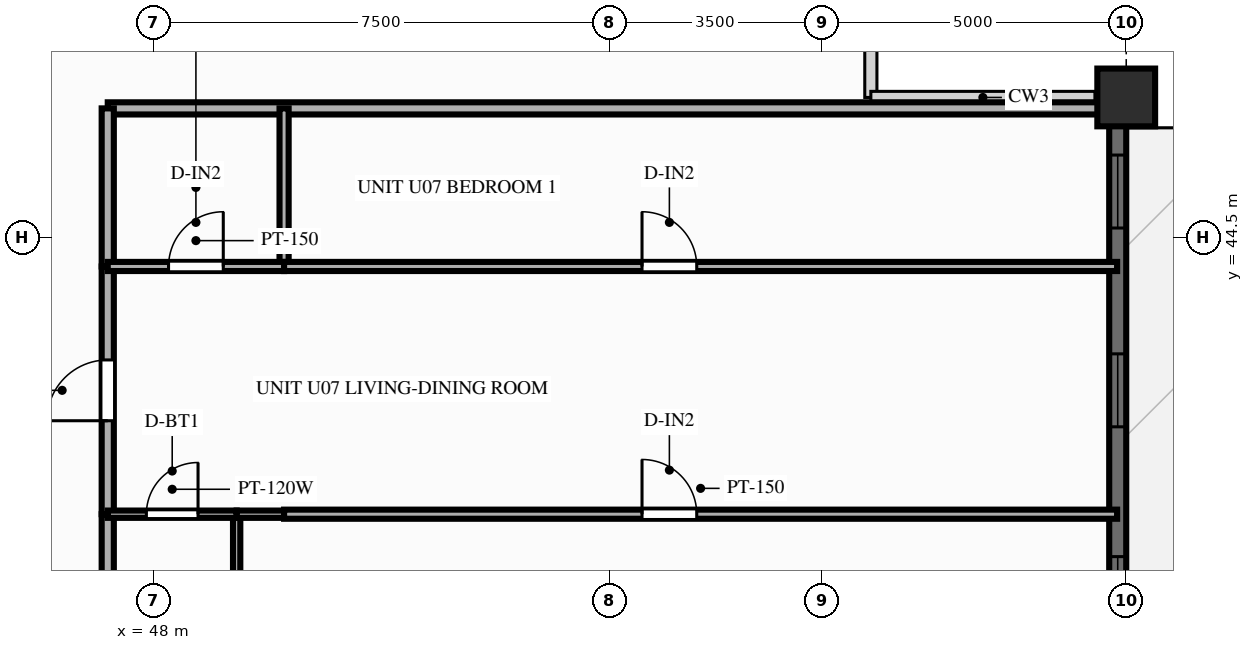
"""IFC4 building model, lengths in metres.
Left out: names, types, materials, properties, quantities, classifications, styles, units other than length and angle.
Written with IfcOpenShell. Run it as: python <this file> out.ifc"""

import sys

from ifc_helpers import new_model, si_unit, direction, frame, frame_2d, origin, origin_2d, place, context, subcontext, project, spatial, rectangle, extrude, source, transform, mapped, element, fill, save


model = new_model("IFC4")
c1 = context("Model", 3, precision=1e-05, world=origin(), true_north=direction((0.0, 1.0)))
c2 = subcontext(c1, "Body", "Model", "MODEL_VIEW")
j1 = project(units=[si_unit("LENGTHUNIT", "METRE"), si_unit("PLANEANGLEUNIT", "RADIAN")], contexts=[c1])
p1 = place(None, origin())
s1 = spatial("IfcSite", under=j1, at=p1, CompositionType="ELEMENT")
p2 = place(p1, origin())
s2 = spatial("IfcBuilding", under=s1, at=p2, CompositionType="ELEMENT")
p3 = place(p2, frame((0.0, 0.0, 98.85)))
s3 = spatial("IfcBuildingStorey", under=s2, at=p3, CompositionType="ELEMENT", Elevation=98.85)
m1 = source(origin(), c2, "Body", "SweptSolid", [
    extrude(rectangle(XDim=0.95, YDim=0.95, at=origin_2d()), origin(), (0.0, 0.0, 1.0), 3.0),
])
p4 = place(p3, frame((64.0, 46.8, 0.0), z_axis=(0.0, 0.0, 1.0), x_axis=(1.0, 0.0, 0.0)))
e1 = element("IfcColumn", 1, at=p4, inside=s3, PredefinedType="COLUMN", context=c2, shape_type="MappedRepresentation", body=[
    mapped(m1, transform((0.0, 0.0, 0.0), scale=1.0)),
])
p5 = place(p3, frame((63.86, 7.2, 0.0), z_axis=(0.0, 0.0, 1.0), x_axis=(0.0, 1.0, 0.0)))
e2 = element("IfcWall", 2, at=p5, inside=s3, PredefinedType="SOLIDWALL", context=c2, shape_type="SweptSolid", body=[
    extrude(rectangle(XDim=39.6, YDim=0.28, at=frame_2d((19.8, 0.0))), origin(), (0.0, 0.0, 1.0), 2.28),
])
p6 = place(p5, frame((0.945, 0.0, 0.25)))
e3 = element("IfcOpeningElement", 3, at=p6, cuts=e2, PredefinedType="OPENING", context=c2, shape_type="SweptSolid", body=[
    extrude(rectangle(XDim=1.2, YDim=1.5, at=frame_2d((0.6, 0.75))), frame((0.0, 0.152, 0.0), z_axis=(0.0, -1.0, 0.0), x_axis=(1.0, 0.0, 0.0)), (0.0, 0.0, 1.0), 0.304),
])
p7 = place(p5, frame((4.213, 0.0, 0.25)))
e4 = element("IfcOpeningElement", 4, at=p7, cuts=e2, PredefinedType="OPENING", context=c2, shape_type="SweptSolid", body=[
    extrude(rectangle(XDim=1.2, YDim=1.5, at=frame_2d((0.6, 0.75))), frame((0.0, 0.152, 0.0), z_axis=(0.0, -1.0, 0.0), x_axis=(1.0, 0.0, 0.0)), (0.0, 0.0, 1.0), 0.304),
])
p8 = place(p5, frame((7.55, 0.0, 0.25)))
e5 = element("IfcOpeningElement", 5, at=p8, cuts=e2, PredefinedType="OPENING", context=c2, shape_type="SweptSolid", body=[
    extrude(rectangle(XDim=1.2, YDim=1.5, at=frame_2d((0.6, 0.75))), frame((0.0, 0.152, 0.0), z_axis=(0.0, -1.0, 0.0), x_axis=(1.0, 0.0, 0.0)), (0.0, 0.0, 1.0), 0.304),
])
p9 = place(p5, frame((13.483, 0.0, 0.25)))
e6 = element("IfcOpeningElement", 6, at=p9, cuts=e2, PredefinedType="OPENING", context=c2, shape_type="SweptSolid", body=[
    extrude(rectangle(XDim=1.2, YDim=1.5, at=frame_2d((0.6, 0.75))), frame((0.0, 0.152, 0.0), z_axis=(0.0, -1.0, 0.0), x_axis=(1.0, 0.0, 0.0)), (0.0, 0.0, 1.0), 0.304),
])
p10 = place(p5, frame((16.82, 0.0, 0.25)))
e7 = element("IfcOpeningElement", 7, at=p10, cuts=e2, PredefinedType="OPENING", context=c2, shape_type="SweptSolid", body=[
    extrude(rectangle(XDim=1.2, YDim=1.5, at=frame_2d((0.6, 0.75))), frame((0.0, 0.152, 0.0), z_axis=(0.0, -1.0, 0.0), x_axis=(1.0, 0.0, 0.0)), (0.0, 0.0, 1.0), 0.304),
])
p11 = place(p5, frame((19.2, 0.0, 0.25)))
e8 = element("IfcOpeningElement", 8, at=p11, cuts=e2, PredefinedType="OPENING", context=c2, shape_type="SweptSolid", body=[
    extrude(rectangle(XDim=1.2, YDim=1.5, at=frame_2d((0.6, 0.75))), frame((0.0, 0.152, 0.0), z_axis=(0.0, -1.0, 0.0), x_axis=(1.0, 0.0, 0.0)), (0.0, 0.0, 1.0), 0.304),
])
p12 = place(p5, frame((21.578, 0.0, 0.25)))
e9 = element("IfcOpeningElement", 9, at=p12, cuts=e2, PredefinedType="OPENING", context=c2, shape_type="SweptSolid", body=[
    extrude(rectangle(XDim=1.2, YDim=1.5, at=frame_2d((0.6, 0.75))), frame((0.0, 0.152, 0.0), z_axis=(0.0, -1.0, 0.0), x_axis=(1.0, 0.0, 0.0)), (0.0, 0.0, 1.0), 0.304),
])
p13 = place(p5, frame((26.313, 0.0, 0.0), z_axis=(0.0, 0.0, 1.0), x_axis=(-1.0, 0.0, 0.0)))
e10 = element("IfcOpeningElement", 10, at=p13, cuts=e2, PredefinedType="OPENING", context=c2, shape_type="SweptSolid", body=[
    extrude(rectangle(XDim=1.6, YDim=2.15, at=frame_2d((0.8, 1.075))), frame((0.0, 0.152, 0.0), z_axis=(0.0, -1.0, 0.0), x_axis=(1.0, 0.0, 0.0)), (0.0, 0.0, 1.0), 0.304),
])
p14 = place(p5, frame((29.305, 0.0, 0.25)))
e11 = element("IfcOpeningElement", 11, at=p14, cuts=e2, PredefinedType="OPENING", context=c2, shape_type="SweptSolid", body=[
    extrude(rectangle(XDim=0.7, YDim=1.5, at=frame_2d((0.35, 0.75))), frame((0.0, 0.152, 0.0), z_axis=(0.0, -1.0, 0.0), x_axis=(1.0, 0.0, 0.0)), (0.0, 0.0, 1.0), 0.304),
])
p15 = place(p5, frame((30.848, 0.0, 0.25)))
e12 = element("IfcOpeningElement", 12, at=p15, cuts=e2, PredefinedType="OPENING", context=c2, shape_type="SweptSolid", body=[
    extrude(rectangle(XDim=1.2, YDim=1.5, at=frame_2d((0.6, 0.75))), frame((0.0, 0.152, 0.0), z_axis=(0.0, -1.0, 0.0), x_axis=(1.0, 0.0, 0.0)), (0.0, 0.0, 1.0), 0.304),
])
p16 = place(p5, frame((34.183, 0.0, 0.25)))
e13 = element("IfcOpeningElement", 13, at=p16, cuts=e2, PredefinedType="OPENING", context=c2, shape_type="SweptSolid", body=[
    extrude(rectangle(XDim=1.2, YDim=1.5, at=frame_2d((0.6, 0.75))), frame((0.0, 0.152, 0.0), z_axis=(0.0, -1.0, 0.0), x_axis=(1.0, 0.0, 0.0)), (0.0, 0.0, 1.0), 0.304),
])
p17 = place(p5, frame((37.452, 0.0, 0.25)))
e14 = element("IfcOpeningElement", 14, at=p17, cuts=e2, PredefinedType="OPENING", context=c2, shape_type="SweptSolid", body=[
    extrude(rectangle(XDim=1.2, YDim=1.5, at=frame_2d((0.6, 0.75))), frame((0.0, 0.152, 0.0), z_axis=(0.0, -1.0, 0.0), x_axis=(1.0, 0.0, 0.0)), (0.0, 0.0, 1.0), 0.304),
])
p18 = place(p3, frame((47.25, 46.62, 0.0), z_axis=(0.0, 0.0, 1.0), x_axis=(1.0, 0.0, 0.0)))
e15 = element("IfcWall", 15, at=p18, inside=s3, PredefinedType="PARTITIONING", context=c2, shape_type="SweptSolid", body=[
    extrude(rectangle(XDim=16.6, YDim=0.2, at=frame_2d((8.3, 0.0))), origin(), (0.0, 0.0, 1.0), 2.79),
])
p19 = place(p3, frame((47.25, 37.35, 0.0), z_axis=(0.0, 0.0, 1.0), x_axis=(0.0, 1.0, 0.0)))
e16 = element("IfcWall", 16, at=p19, inside=s3, PredefinedType="PARTITIONING", context=c2, shape_type="SweptSolid", body=[
    extrude(rectangle(XDim=2.595, YDim=0.2, at=frame_2d((1.298, 0.0))), origin(), (0.0, 0.0, 1.0), 2.79),
])
p20 = place(p3, frame((47.25, 39.946, 0.0), z_axis=(0.0, 0.0, 1.0), x_axis=(0.0, 1.0, 0.0)))
e17 = element("IfcWall", 17, at=p20, inside=s3, PredefinedType="PARTITIONING", context=c2, shape_type="SweptSolid", body=[
    extrude(rectangle(XDim=4.074, YDim=0.2, at=frame_2d((2.037, 0.0))), origin(), (0.0, 0.0, 1.0), 2.79),
])
p21 = place(p20, frame((1.537, 0.0, 0.0)))
e18 = element("IfcOpeningElement", 18, at=p21, cuts=e17, PredefinedType="OPENING", context=c2, shape_type="SweptSolid", body=[
    extrude(rectangle(XDim=1.0, YDim=2.15, at=frame_2d((0.5, 1.075))), frame((0.0, 0.112, 0.0), z_axis=(0.0, -1.0, 0.0), x_axis=(1.0, 0.0, 0.0)), (0.0, 0.0, 1.0), 0.224),
])
p22 = place(p3, frame((47.25, 44.02, 0.0), z_axis=(0.0, 0.0, 1.0), x_axis=(0.0, 1.0, 0.0)))
e19 = element("IfcWall", 19, at=p22, inside=s3, PredefinedType="PARTITIONING", context=c2, shape_type="SweptSolid", body=[
    extrude(rectangle(XDim=2.6, YDim=0.2, at=frame_2d((1.3, 0.0))), origin(), (0.0, 0.0, 1.0), 2.79),
])
p23 = place(p3, frame((49.37, 37.35, 0.0), z_axis=(0.0, 0.0, 1.0), x_axis=(0.0, 1.0, 0.0)))
e20 = element("IfcWall", 20, at=p23, inside=s3, PredefinedType="PARTITIONING", context=c2, shape_type="SweptSolid", body=[
    extrude(rectangle(XDim=2.595, YDim=0.12, at=frame_2d((1.298, 0.0))), origin(), (0.0, 0.0, 1.0), 2.79),
])
p24 = place(p3, frame((50.15, 44.02, 0.0), z_axis=(0.0, 0.0, 1.0), x_axis=(0.0, 1.0, 0.0)))
e21 = element("IfcWall", 21, at=p24, inside=s3, PredefinedType="PARTITIONING", context=c2, shape_type="SweptSolid", body=[
    extrude(rectangle(XDim=2.6, YDim=0.15, at=frame_2d((1.3, 0.0))), origin(), (0.0, 0.0, 1.0), 2.79),
])
p25 = place(p3, frame((47.25, 39.946, 0.0), z_axis=(0.0, 0.0, 1.0), x_axis=(1.0, 0.0, 0.0)))
e22 = element("IfcWall", 22, at=p25, inside=s3, PredefinedType="PARTITIONING", context=c2, shape_type="SweptSolid", body=[
    extrude(rectangle(XDim=2.12, YDim=0.12, at=frame_2d((1.06, 0.0))), origin(), (0.0, 0.0, 1.0), 2.79),
])
p26 = place(p25, frame((0.635, 0.0, 0.0)))
e23 = element("IfcOpeningElement", 23, at=p26, cuts=e22, PredefinedType="OPENING", context=c2, shape_type="SweptSolid", body=[
    extrude(rectangle(XDim=0.85, YDim=2.05, at=frame_2d((0.425, 1.025))), frame((0.0, 0.072, 0.0), z_axis=(0.0, -1.0, 0.0), x_axis=(1.0, 0.0, 0.0)), (0.0, 0.0, 1.0), 0.144),
])
p27 = place(p3, frame((49.37, 39.946, 0.0), z_axis=(0.0, 0.0, 1.0), x_axis=(1.0, 0.0, 0.0)))
e24 = element("IfcWall", 24, at=p27, inside=s3, PredefinedType="PARTITIONING", context=c2, shape_type="SweptSolid", body=[
    extrude(rectangle(XDim=0.78, YDim=0.12, at=frame_2d((0.39, 0.0))), origin(), (0.0, 0.0, 1.0), 2.79),
])
p28 = place(p3, frame((50.15, 39.946, 0.0), z_axis=(0.0, 0.0, 1.0), x_axis=(1.0, 0.0, 0.0)))
e25 = element("IfcWall", 25, at=p28, inside=s3, PredefinedType="PARTITIONING", context=c2, shape_type="SweptSolid", body=[
    extrude(rectangle(XDim=13.7, YDim=0.15, at=frame_2d((6.85, 0.0))), origin(), (0.0, 0.0, 1.0), 2.79),
])
p29 = place(p28, frame((5.887, 0.0, 0.0)))
e26 = element("IfcOpeningElement", 26, at=p29, cuts=e25, PredefinedType="OPENING", context=c2, shape_type="SweptSolid", body=[
    extrude(rectangle(XDim=0.9, YDim=2.1, at=frame_2d((0.45, 1.05))), frame((0.0, 0.087, 0.0), z_axis=(0.0, -1.0, 0.0), x_axis=(1.0, 0.0, 0.0)), (0.0, 0.0, 1.0), 0.174),
])
p30 = place(p3, frame((47.25, 44.02, 0.0), z_axis=(0.0, 0.0, 1.0), x_axis=(1.0, 0.0, 0.0)))
e27 = element("IfcWall", 27, at=p30, inside=s3, PredefinedType="PARTITIONING", context=c2, shape_type="SweptSolid", body=[
    extrude(rectangle(XDim=2.9, YDim=0.15, at=frame_2d((1.45, 0.0))), origin(), (0.0, 0.0, 1.0), 2.79),
])
p31 = place(p30, frame((1.0, 0.0, 0.0)))
e28 = element("IfcOpeningElement", 28, at=p31, cuts=e27, PredefinedType="OPENING", context=c2, shape_type="SweptSolid", body=[
    extrude(rectangle(XDim=0.9, YDim=2.1, at=frame_2d((0.45, 1.05))), frame((0.0, 0.087, 0.0), z_axis=(0.0, -1.0, 0.0), x_axis=(1.0, 0.0, 0.0)), (0.0, 0.0, 1.0), 0.174),
])
p32 = place(p3, frame((50.15, 44.02, 0.0), z_axis=(0.0, 0.0, 1.0), x_axis=(1.0, 0.0, 0.0)))
e29 = element("IfcWall", 29, at=p32, inside=s3, PredefinedType="PARTITIONING", context=c2, shape_type="SweptSolid", body=[
    extrude(rectangle(XDim=13.7, YDim=0.15, at=frame_2d((6.85, 0.0))), origin(), (0.0, 0.0, 1.0), 2.79),
])
p33 = place(p32, frame((5.887, 0.0, 0.0)))
e30 = element("IfcOpeningElement", 30, at=p33, cuts=e29, PredefinedType="OPENING", context=c2, shape_type="SweptSolid", body=[
    extrude(rectangle(XDim=0.9, YDim=2.1, at=frame_2d((0.45, 1.05))), frame((0.0, 0.087, 0.0), z_axis=(0.0, -1.0, 0.0), x_axis=(1.0, 0.0, 0.0)), (0.0, 0.0, 1.0), 0.174),
])
m2 = source(origin(), c2, "Body", "SweptSolid", [
    extrude(rectangle(XDim=1.2, YDim=1.5, at=frame_2d((0.6, 0.75))), frame((0.0, 0.03, 0.0), z_axis=(0.0, -1.0, 0.0), x_axis=(1.0, 0.0, 0.0)), (0.0, 0.0, 1.0), 0.06),
])
p34 = place(p15, origin())
e31 = element("IfcWindow", 31, at=p34, inside=s3, PartitioningType="SINGLE_PANEL", PredefinedType="WINDOW", context=c2, shape_type="MappedRepresentation", body=[
    mapped(m2, transform((0.0, 0.0, 0.0), scale=1.0)),
])
fill(e12, e31)
p35 = place(p16, origin())
e32 = element("IfcWindow", 32, at=p35, inside=s3, PartitioningType="SINGLE_PANEL", PredefinedType="WINDOW", context=c2, shape_type="MappedRepresentation", body=[
    mapped(m2, transform((0.0, 0.0, 0.0), scale=1.0)),
])
fill(e13, e32)
p36 = place(p17, origin())
e33 = element("IfcWindow", 33, at=p36, inside=s3, PartitioningType="SINGLE_PANEL", PredefinedType="WINDOW", context=c2, shape_type="MappedRepresentation", body=[
    mapped(m2, transform((0.0, 0.0, 0.0), scale=1.0)),
])
fill(e14, e33)
m3 = source(origin(), c2, "Body", "SweptSolid", [
    extrude(rectangle(XDim=1.0, YDim=2.15, at=frame_2d((0.5, 1.075))), frame((0.0, 0.025, 0.0), z_axis=(0.0, -1.0, 0.0), x_axis=(1.0, 0.0, 0.0)), (0.0, 0.0, 1.0), 0.05),
])
p37 = place(p21, origin())
e34 = element("IfcDoor", 34, at=p37, inside=s3, OperationType="SINGLE_SWING_LEFT", PredefinedType="DOOR", context=c2, shape_type="MappedRepresentation", body=[
    mapped(m3, transform((0.0, 0.0, 0.0), scale=1.0)),
])
fill(e18, e34)
m4 = source(origin(), c2, "Body", "SweptSolid", [
    extrude(rectangle(XDim=0.85, YDim=2.05, at=frame_2d((0.425, 1.025))), frame((0.0, 0.025, 0.0), z_axis=(0.0, -1.0, 0.0), x_axis=(1.0, 0.0, 0.0)), (0.0, 0.0, 1.0), 0.05),
])
p38 = place(p26, origin())
e35 = element("IfcDoor", 35, at=p38, inside=s3, OperationType="SINGLE_SWING_RIGHT", PredefinedType="DOOR", context=c2, shape_type="MappedRepresentation", body=[
    mapped(m4, transform((0.0, 0.0, 0.0), scale=1.0)),
])
fill(e23, e35)
m5 = source(origin(), c2, "Body", "SweptSolid", [
    extrude(rectangle(XDim=0.9, YDim=2.1, at=frame_2d((0.45, 1.05))), frame((0.0, 0.025, 0.0), z_axis=(0.0, -1.0, 0.0), x_axis=(1.0, 0.0, 0.0)), (0.0, 0.0, 1.0), 0.05),
])
p39 = place(p29, origin())
e36 = element("IfcDoor", 36, at=p39, inside=s3, OperationType="SINGLE_SWING_LEFT", PredefinedType="DOOR", context=c2, shape_type="MappedRepresentation", body=[
    mapped(m5, transform((0.0, 0.0, 0.0), scale=1.0)),
])
fill(e26, e36)
p40 = place(p31, origin())
e37 = element("IfcDoor", 37, at=p40, inside=s3, OperationType="SINGLE_SWING_RIGHT", PredefinedType="DOOR", context=c2, shape_type="MappedRepresentation", body=[
    mapped(m5, transform((0.0, 0.0, 0.0), scale=1.0)),
])
fill(e28, e37)
p41 = place(p33, origin())
e38 = element("IfcDoor", 38, at=p41, inside=s3, OperationType="SINGLE_SWING_LEFT", PredefinedType="DOOR", context=c2, shape_type="MappedRepresentation", body=[
    mapped(m5, transform((0.0, 0.0, 0.0), scale=1.0)),
])
fill(e30, e38)
save(model, sys.argv[1])
